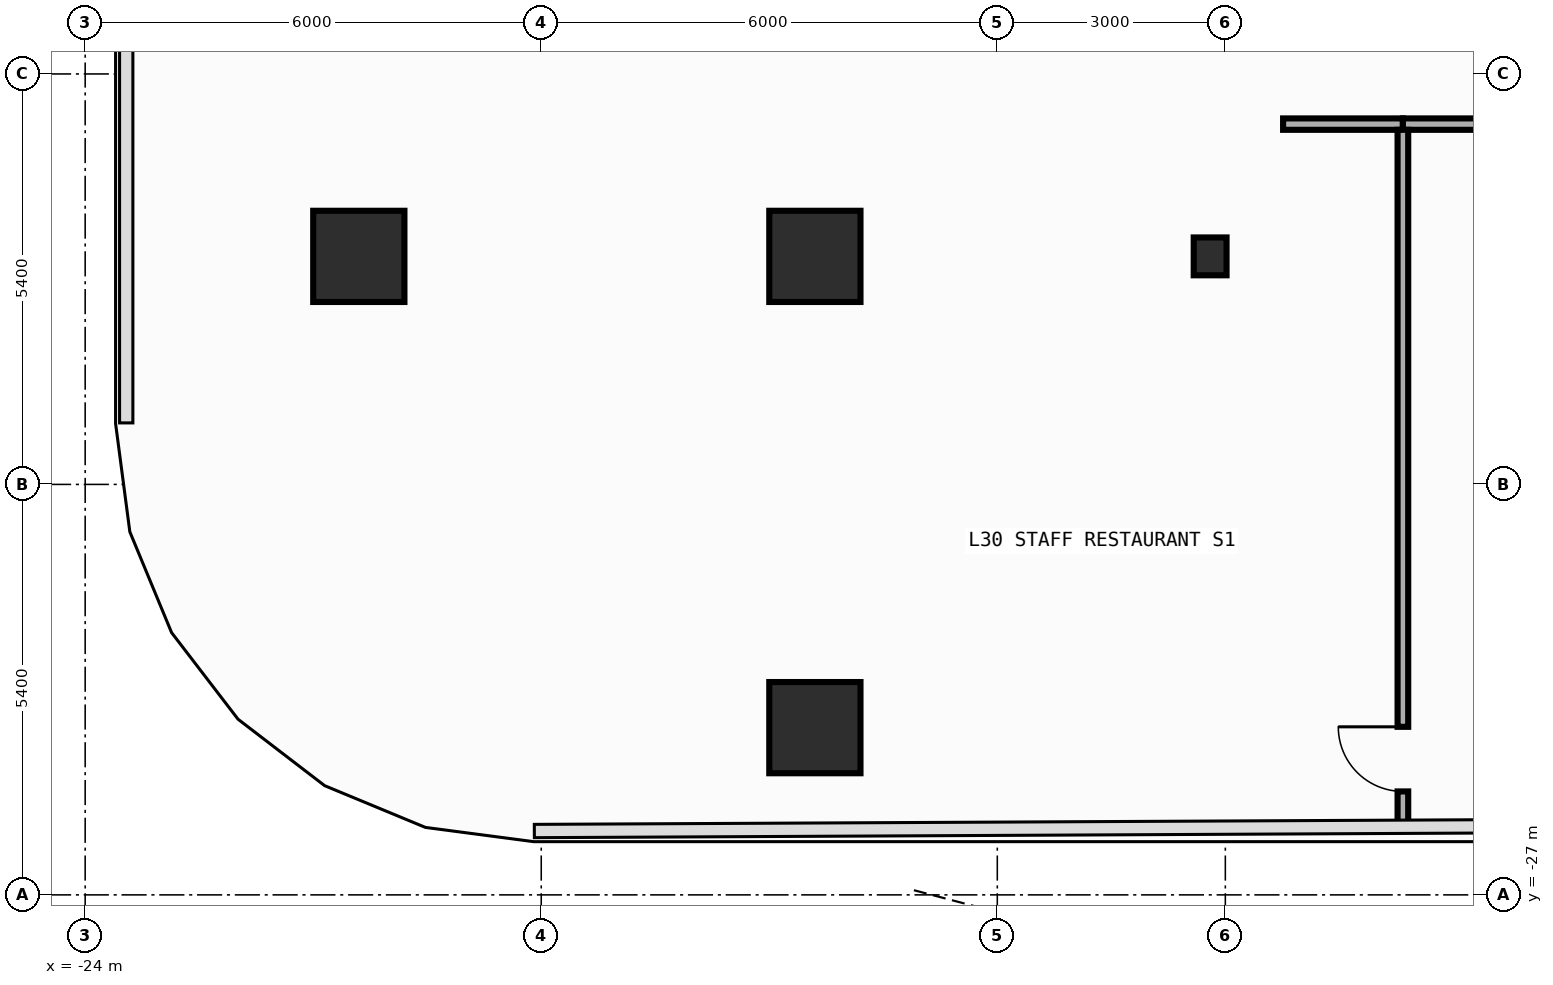
"""IFC4 building model, lengths in metres.
Left out: names, types, materials, properties, quantities, classifications, styles, units other than length and angle.
Written with IfcOpenShell. Run it as: python <this file> out.ifc"""

import sys

from ifc_helpers import new_model, si_unit, direction, frame, frame_2d, origin, origin_2d, place, context, subcontext, project, spatial, rectangle, i_section, extrude, element, fill, save


model = new_model("IFC4")
c1 = context("Model", 3, precision=1e-05, world=origin(), true_north=direction((0.0, 1.0)))
c2 = subcontext(c1, "Body", "Model", "MODEL_VIEW")
j1 = project(units=[si_unit("LENGTHUNIT", "METRE"), si_unit("PLANEANGLEUNIT", "RADIAN")], contexts=[c1])
p1 = place(None, origin())
s1 = spatial("IfcSite", under=j1, at=p1, CompositionType="ELEMENT")
p2 = place(p1, origin())
s2 = spatial("IfcBuilding", under=s1, at=p2, CompositionType="ELEMENT")
p3 = place(p2, frame((0.0, 0.0, 131.0)))
s3 = spatial("IfcBuildingStorey", under=s2, at=p3, CompositionType="ELEMENT", Elevation=131.0)
p4 = place(p3, frame((-9.2, -18.6, 0.0), z_axis=(0.0, 0.0, 1.0), x_axis=(1.0, 0.0, 0.0)))
e1 = element("IfcColumn", 1, at=p4, inside=s3, PredefinedType="COLUMN", context=c2, shape_type="SweptSolid", body=[
    extrude(i_section(OverallWidth=0.432, OverallDepth=0.498, WebThickness=0.045, FlangeThickness=0.07, FilletRadius=0.022, at=origin_2d()), origin(), (0.0, 0.0, 1.0), 4.2),
])
for number, where, z_axis, x_axis in (
    (2, (-20.4, -18.6, 0.0), (0.0, 0.0, 1.0), (1.0, 0.0, 0.0)),
    (3, (-14.4, -18.6, 0.0), (0.0, 0.0, 1.0), (1.0, 0.0, 0.0)),
    (4, (-14.4, -24.8, 0.0), (0.0, 0.0, 1.0), (1.0, 0.0, 0.0)),
):
    element("IfcColumn", number, at=place(p3, frame(where, z_axis=z_axis, x_axis=x_axis)), inside=s3, PredefinedType="COLUMN", context=c2, shape_type="SweptSolid", body=[
        extrude(rectangle(XDim=1.2, YDim=1.2, at=origin_2d()), origin(), (0.0, 0.0, 1.0), 4.2),
    ])
p5 = place(p3, frame((-8.24, -16.86, 0.0), z_axis=(0.0, 0.0, 1.0), x_axis=(1.0, 0.0, 0.0)))
e5 = element("IfcWall", 5, at=p5, inside=s3, PredefinedType="PARTITIONING", context=c2, shape_type="SweptSolid", body=[
    extrude(rectangle(XDim=1.576, YDim=0.15, at=frame_2d((0.788, 0.0))), origin(), (0.0, 0.0, 1.0), 3.94),
])
p6 = place(p3, frame((-6.664, -16.86, 0.0), z_axis=(0.0, 0.0, 1.0), x_axis=(1.0, 0.0, 0.0)))
e6 = element("IfcWall", 6, at=p6, inside=s3, PredefinedType="PARTITIONING", context=c2, shape_type="SweptSolid", body=[
    extrude(rectangle(XDim=16.114, YDim=0.15, at=frame_2d((8.057, 0.0))), origin(), (0.0, 0.0, 1.0), 3.94),
])
p7 = place(p6, frame((13.343, 0.0, 0.0)))
e7 = element("IfcOpeningElement", 7, at=p7, cuts=e6, PredefinedType="OPENING", context=c2, shape_type="SweptSolid", body=[
    extrude(rectangle(XDim=0.9, YDim=2.15, at=frame_2d((0.45, 1.075))), frame((0.0, 0.085, 0.0), z_axis=(0.0, -1.0, 0.0), x_axis=(1.0, 0.0, 0.0)), (0.0, 0.0, 1.0), 0.17),
])
p8 = place(p3, frame((-6.664, -26.099, 0.0), z_axis=(0.0, 0.0, 1.0), x_axis=(0.0, 1.0, 0.0)))
e8 = element("IfcWall", 8, at=p8, inside=s3, PredefinedType="PARTITIONING", context=c2, shape_type="SweptSolid", body=[
    extrude(rectangle(XDim=9.164, YDim=0.14, at=frame_2d((4.582, 0.0))), origin(), (0.0, 0.0, 1.0), 3.94),
])
p9 = place(p8, frame((0.46, 0.0, 0.0)))
e9 = element("IfcOpeningElement", 9, at=p9, cuts=e8, PredefinedType="OPENING", context=c2, shape_type="SweptSolid", body=[
    extrude(rectangle(XDim=0.85, YDim=2.1, at=frame_2d((0.425, 1.05))), frame((0.0, 0.08, 0.0), z_axis=(0.0, -1.0, 0.0), x_axis=(1.0, 0.0, 0.0)), (0.0, 0.0, 1.0), 0.16),
])
p10 = place(p9, origin())
e10 = element("IfcDoor", 10, at=p10, inside=s3, OperationType="SINGLE_SWING_RIGHT", PredefinedType="DOOR", context=c2, shape_type="SweptSolid", body=[
    extrude(rectangle(XDim=0.85, YDim=2.1, at=frame_2d((0.425, 1.05))), frame((0.0, 0.025, 0.0), z_axis=(0.0, -1.0, 0.0), x_axis=(1.0, 0.0, 0.0)), (0.0, 0.0, 1.0), 0.05),
])
fill(e9, e10)
save(model, sys.argv[1])
